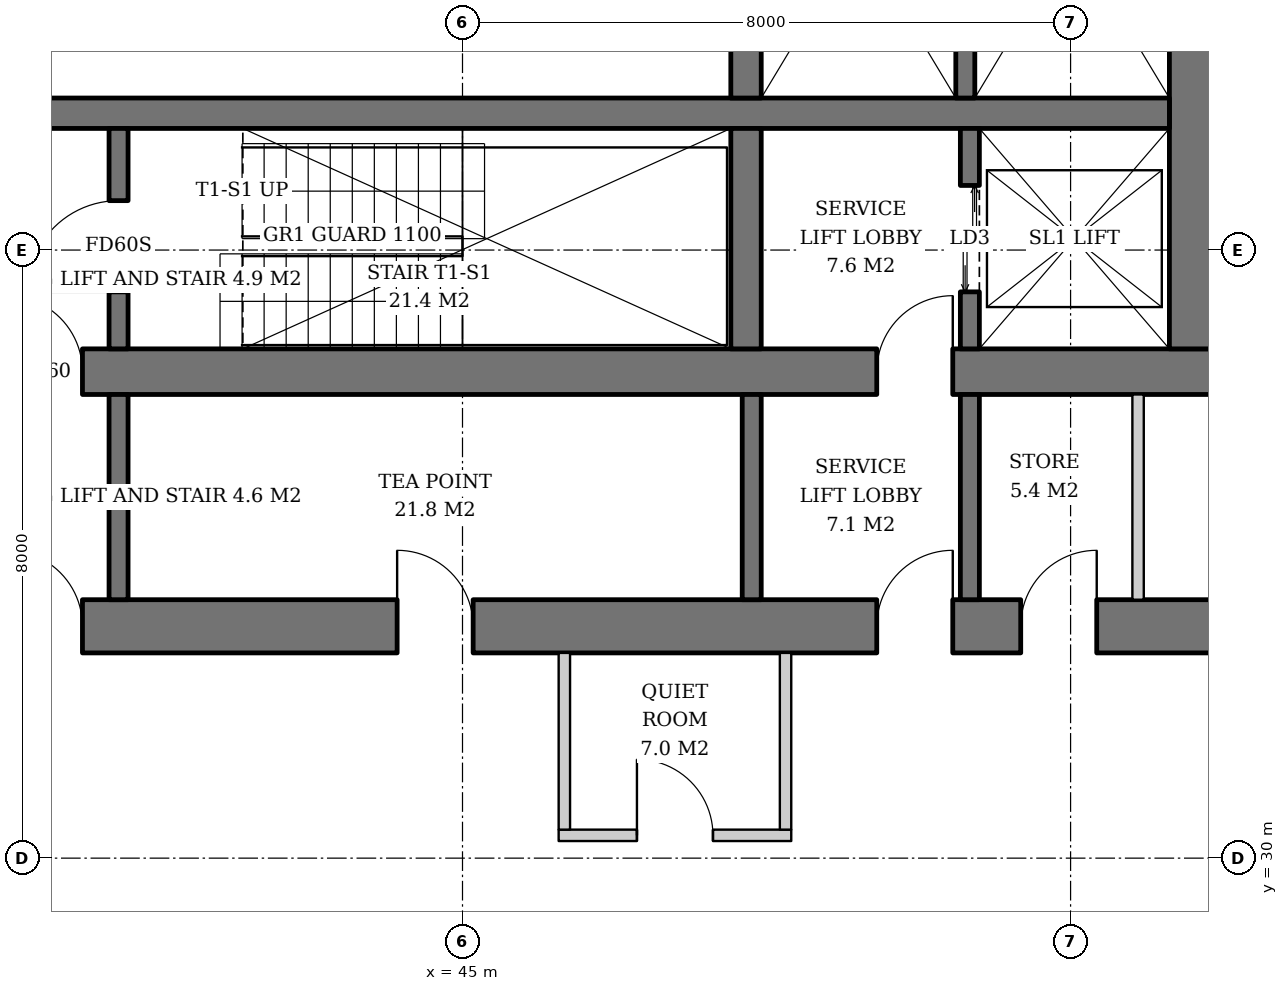
"""IFC4 building model, lengths in metres.
Left out: names, types, materials, properties, quantities, classifications, styles, units other than length and angle.
Written with IfcOpenShell. Run it as: python <this file> out.ifc"""

import sys

from ifc_helpers import new_model, si_unit, direction, frame, frame_2d, origin, place, context, subcontext, project, spatial, rectangle, extrude, element, fill, save


model = new_model("IFC4")
c1 = context("Model", 3, precision=1e-05, world=origin(), true_north=direction((0.0, 1.0)))
c2 = subcontext(c1, "Body", "Model", "MODEL_VIEW")
j1 = project(units=[si_unit("LENGTHUNIT", "METRE"), si_unit("PLANEANGLEUNIT", "RADIAN")], contexts=[c1])
p1 = place(None, origin())
s1 = spatial("IfcSite", under=j1, at=p1, CompositionType="ELEMENT")
p2 = place(p1, origin())
s2 = spatial("IfcBuilding", under=s1, at=p2, CompositionType="ELEMENT")
p3 = place(p2, frame((0.0, 0.0, 104.6)))
s3 = spatial("IfcBuildingStorey", under=s2, at=p3, CompositionType="ELEMENT", Elevation=104.6)
p4 = place(p3, frame((35.1, 36.4, 0.0), z_axis=(0.0, 0.0, 1.0), x_axis=(1.0, 0.0, 0.0)))
e1 = element("IfcWall", 1, at=p4, inside=s3, PredefinedType="SHEAR", context=c2, shape_type="SweptSolid", body=[
    extrude(rectangle(XDim=19.8, YDim=0.6, at=frame_2d((9.9, 0.0))), origin(), (0.0, 0.0, 1.0), 3.8),
])
p5 = place(p4, frame((3.9, 0.0, 0.0)))
e2 = element("IfcOpeningElement", 2, at=p5, cuts=e1, PredefinedType="OPENING", context=c2, shape_type="SweptSolid", body=[
    extrude(rectangle(XDim=1.0, YDim=2.1, at=frame_2d((0.5, 1.05))), frame((0.0, 0.31, 0.0), z_axis=(0.0, -1.0, 0.0), x_axis=(1.0, 0.0, 0.0)), (0.0, 0.0, 1.0), 0.62),
])
p6 = place(p4, frame((15.35, 0.0, 0.0)))
e3 = element("IfcOpeningElement", 3, at=p6, cuts=e1, PredefinedType="OPENING", context=c2, shape_type="SweptSolid", body=[
    extrude(rectangle(XDim=1.0, YDim=2.1, at=frame_2d((0.5, 1.05))), frame((0.0, 0.31, 0.0), z_axis=(0.0, -1.0, 0.0), x_axis=(1.0, 0.0, 0.0)), (0.0, 0.0, 1.0), 0.62),
])
p7 = place(p3, frame((54.6, 36.7, 0.0), z_axis=(0.0, 0.0, 1.0), x_axis=(0.0, 1.0, 0.0)))
e4 = element("IfcWall", 4, at=p7, inside=s3, PredefinedType="SHEAR", context=c2, shape_type="SweptSolid", body=[
    extrude(rectangle(XDim=18.6, YDim=0.6, at=frame_2d((9.3, 0.0))), origin(), (0.0, 0.0, 1.0), 3.8),
])
p8 = place(p7, frame((8.4, 0.0, 0.0)))
e5 = element("IfcOpeningElement", 5, at=p8, cuts=e4, PredefinedType="OPENING", context=c2, shape_type="SweptSolid", body=[
    extrude(rectangle(XDim=1.8, YDim=2.4, at=frame_2d((0.9, 1.2))), frame((0.0, 0.31, 0.0), z_axis=(0.0, -1.0, 0.0), x_axis=(1.0, 0.0, 0.0)), (0.0, 0.0, 1.0), 0.62),
])
p9 = place(p3, frame((31.7, 33.05, 0.0), z_axis=(0.0, 0.0, 1.0), x_axis=(1.0, 0.0, 0.0)))
e6 = element("IfcWall", 6, at=p9, inside=s3, PredefinedType="SHEAR", context=c2, shape_type="SweptSolid", body=[
    extrude(rectangle(XDim=26.6, YDim=0.7, at=frame_2d((13.3, 0.0))), origin(), (0.0, 0.0, 1.0), 3.8),
])
p10 = place(p9, frame((7.3, 0.0, 0.0)))
e7 = element("IfcOpeningElement", 7, at=p10, cuts=e6, PredefinedType="OPENING", context=c2, shape_type="SweptSolid", body=[
    extrude(rectangle(XDim=1.0, YDim=2.1, at=frame_2d((0.5, 1.05))), frame((0.0, 0.36, 0.0), z_axis=(0.0, -1.0, 0.0), x_axis=(1.0, 0.0, 0.0)), (0.0, 0.0, 1.0), 0.72),
])
p11 = place(p9, frame((18.75, 0.0, 0.0)))
e8 = element("IfcOpeningElement", 8, at=p11, cuts=e6, PredefinedType="OPENING", context=c2, shape_type="SweptSolid", body=[
    extrude(rectangle(XDim=1.0, YDim=2.1, at=frame_2d((0.5, 1.05))), frame((0.0, 0.36, 0.0), z_axis=(0.0, -1.0, 0.0), x_axis=(1.0, 0.0, 0.0)), (0.0, 0.0, 1.0), 0.72),
])
p12 = place(p9, frame((1.85, 0.0, 0.0)))
e9 = element("IfcOpeningElement", 9, at=p12, cuts=e6, PredefinedType="OPENING", context=c2, shape_type="SweptSolid", body=[
    extrude(rectangle(XDim=1.0, YDim=2.1, at=frame_2d((0.5, 1.05))), frame((0.0, 0.36, 0.0), z_axis=(0.0, -1.0, 0.0), x_axis=(1.0, 0.0, 0.0)), (0.0, 0.0, 1.0), 0.72),
])
p13 = place(p9, frame((4.7, 0.0, 0.0)))
e10 = element("IfcOpeningElement", 10, at=p13, cuts=e6, PredefinedType="OPENING", context=c2, shape_type="SweptSolid", body=[
    extrude(rectangle(XDim=1.0, YDim=2.1, at=frame_2d((0.5, 1.05))), frame((0.0, 0.36, 0.0), z_axis=(0.0, -1.0, 0.0), x_axis=(1.0, 0.0, 0.0)), (0.0, 0.0, 1.0), 0.72),
])
p14 = place(p9, frame((12.44, 0.0, 0.0)))
e11 = element("IfcOpeningElement", 11, at=p14, cuts=e6, PredefinedType="OPENING", context=c2, shape_type="SweptSolid", body=[
    extrude(rectangle(XDim=1.0, YDim=2.1, at=frame_2d((0.5, 1.05))), frame((0.0, 0.36, 0.0), z_axis=(0.0, -1.0, 0.0), x_axis=(1.0, 0.0, 0.0)), (0.0, 0.0, 1.0), 0.72),
])
p15 = place(p9, frame((20.644, 0.0, 0.0)))
e12 = element("IfcOpeningElement", 12, at=p15, cuts=e6, PredefinedType="OPENING", context=c2, shape_type="SweptSolid", body=[
    extrude(rectangle(XDim=1.0, YDim=2.1, at=frame_2d((0.5, 1.05))), frame((0.0, 0.36, 0.0), z_axis=(0.0, -1.0, 0.0), x_axis=(1.0, 0.0, 0.0)), (0.0, 0.0, 1.0), 0.72),
])
p16 = place(p9, frame((23.544, 0.0, 0.0)))
e13 = element("IfcOpeningElement", 13, at=p16, cuts=e6, PredefinedType="OPENING", context=c2, shape_type="SweptSolid", body=[
    extrude(rectangle(XDim=1.0, YDim=2.1, at=frame_2d((0.5, 1.05))), frame((0.0, 0.36, 0.0), z_axis=(0.0, -1.0, 0.0), x_axis=(1.0, 0.0, 0.0)), (0.0, 0.0, 1.0), 0.72),
])
p17 = place(p3, frame((35.7, 39.8, 0.0), z_axis=(0.0, 0.0, 1.0), x_axis=(1.0, 0.0, 0.0)))
e14 = element("IfcWall", 14, at=p17, inside=s3, PredefinedType="SHEAR", context=c2, shape_type="SweptSolid", body=[
    extrude(rectangle(XDim=18.6, YDim=0.4, at=frame_2d((9.3, 0.0))), origin(), (0.0, 0.0, 1.0), 3.8),
])
p18 = place(p3, frame((48.73, 36.7, 0.0), z_axis=(0.0, 0.0, 1.0), x_axis=(0.0, 1.0, 0.0)))
e15 = element("IfcWall", 15, at=p18, inside=s3, PredefinedType="SHEAR", context=c2, shape_type="SweptSolid", body=[
    extrude(rectangle(XDim=2.9, YDim=0.4, at=frame_2d((1.45, 0.0))), origin(), (0.0, 0.0, 1.0), 3.8),
])
p19 = place(p3, frame((48.73, 40.0, 0.0), z_axis=(0.0, 0.0, 1.0), x_axis=(0.0, 1.0, 0.0)))
e16 = element("IfcWall", 16, at=p19, inside=s3, PredefinedType="SHEAR", context=c2, shape_type="SweptSolid", body=[
    extrude(rectangle(XDim=12.0, YDim=0.4, at=frame_2d((6.0, 0.0))), origin(), (0.0, 0.0, 1.0), 3.8),
])
p20 = place(p3, frame((40.475, 36.7, 0.0), z_axis=(0.0, 0.0, 1.0), x_axis=(0.0, 1.0, 0.0)))
e17 = element("IfcWall", 17, at=p20, inside=s3, PredefinedType="SHEAR", context=c2, shape_type="SweptSolid", body=[
    extrude(rectangle(XDim=2.9, YDim=0.25, at=frame_2d((1.45, 0.0))), origin(), (0.0, 0.0, 1.0), 3.8),
])
p21 = place(p20, frame((0.75, 0.0, 0.0)))
e18 = element("IfcOpeningElement", 18, at=p21, cuts=e17, PredefinedType="OPENING", context=c2, shape_type="SweptSolid", body=[
    extrude(rectangle(XDim=1.2, YDim=2.1, at=frame_2d((0.6, 1.05))), frame((0.0, 0.135, 0.0), z_axis=(0.0, -1.0, 0.0), x_axis=(1.0, 0.0, 0.0)), (0.0, 0.0, 1.0), 0.27),
])
p22 = place(p3, frame((51.675, 36.7, 0.0), z_axis=(0.0, 0.0, 1.0), x_axis=(0.0, 1.0, 0.0)))
e19 = element("IfcWall", 19, at=p22, inside=s3, PredefinedType="SHEAR", context=c2, shape_type="SweptSolid", body=[
    extrude(rectangle(XDim=2.9, YDim=0.25, at=frame_2d((1.45, 0.0))), origin(), (0.0, 0.0, 1.0), 3.8),
])
p23 = place(p22, frame((0.75, 0.0, 0.0)))
e20 = element("IfcOpeningElement", 20, at=p23, cuts=e19, PredefinedType="OPENING", context=c2, shape_type="SweptSolid", body=[
    extrude(rectangle(XDim=1.4, YDim=2.4, at=frame_2d((0.7, 1.2))), frame((0.0, 0.135, 0.0), z_axis=(0.0, -1.0, 0.0), x_axis=(1.0, 0.0, 0.0)), (0.0, 0.0, 1.0), 0.27),
])
p24 = place(p3, frame((51.615, 44.25, 0.0), z_axis=(0.0, 0.0, 1.0), x_axis=(0.0, -1.0, 0.0)))
e21 = element("IfcWall", 21, at=p24, inside=s3, PredefinedType="SHEAR", context=c2, shape_type="SweptSolid", body=[
    extrude(rectangle(XDim=4.25, YDim=0.25, at=frame_2d((2.125, 0.0))), origin(), (0.0, 0.0, 1.0), 3.8),
])
for number, where, z_axis, x_axis in (
    (22, (40.475, 33.4, 0.0), (0.0, 0.0, 1.0), (0.0, 1.0, 0.0)),
    (23, (48.805, 33.4, 0.0), (0.0, 0.0, 1.0), (0.0, 1.0, 0.0)),
    (24, (51.675, 33.4, 0.0), (0.0, 0.0, 1.0), (0.0, 1.0, 0.0)),
):
    element("IfcWall", number, at=place(p3, frame(where, z_axis=z_axis, x_axis=x_axis)), inside=s3, PredefinedType="SOLIDWALL", context=c2, shape_type="SweptSolid", body=[
        extrude(rectangle(XDim=2.7, YDim=0.25, at=frame_2d((1.35, 0.0))), origin(), (0.0, 0.0, 1.0), 3.62),
    ])
p25 = place(p3, frame((53.888, 33.4, 0.0), z_axis=(0.0, 0.0, 1.0), x_axis=(0.0, 1.0, 0.0)))
e25 = element("IfcWall", 25, at=p25, inside=s3, PredefinedType="SOLIDWALL", context=c2, shape_type="SweptSolid", body=[
    extrude(rectangle(XDim=2.7, YDim=0.15, at=frame_2d((1.35, 0.0))), origin(), (0.0, 0.0, 1.0), 3.62),
])
p26 = place(p3, frame((46.265, 30.3, 0.0), z_axis=(0.0, 0.0, 1.0), x_axis=(1.0, 0.0, 0.0)))
e26 = element("IfcWall", 26, at=p26, inside=s3, PredefinedType="PARTITIONING", context=c2, shape_type="SweptSolid", body=[
    extrude(rectangle(XDim=3.06, YDim=0.15, at=frame_2d((1.53, 0.0))), origin(), (0.0, 0.0, 1.0), 2.858),
])
p27 = place(p26, frame((1.03, 0.0, 0.0)))
e27 = element("IfcOpeningElement", 27, at=p27, cuts=e26, PredefinedType="OPENING", context=c2, shape_type="SweptSolid", body=[
    extrude(rectangle(XDim=1.0, YDim=2.1, at=frame_2d((0.5, 1.05))), frame((0.0, 0.085, 0.0), z_axis=(0.0, -1.0, 0.0), x_axis=(1.0, 0.0, 0.0)), (0.0, 0.0, 1.0), 0.17),
])
p28 = place(p3, frame((46.34, 32.7, 0.0), z_axis=(0.0, 0.0, 1.0), x_axis=(0.0, -1.0, 0.0)))
e28 = element("IfcWall", 28, at=p28, inside=s3, PredefinedType="PARTITIONING", context=c2, shape_type="SweptSolid", body=[
    extrude(rectangle(XDim=2.325, YDim=0.15, at=frame_2d((1.163, 0.0))), origin(), (0.0, 0.0, 1.0), 3.62),
])
p29 = place(p3, frame((49.25, 32.7, 0.0), z_axis=(0.0, 0.0, 1.0), x_axis=(0.0, -1.0, 0.0)))
e29 = element("IfcWall", 29, at=p29, inside=s3, PredefinedType="PARTITIONING", context=c2, shape_type="SweptSolid", body=[
    extrude(rectangle(XDim=2.325, YDim=0.15, at=frame_2d((1.163, 0.0))), origin(), (0.0, 0.0, 1.0), 2.858),
])
p30 = place(p21, origin())
e30 = element("IfcDoor", 30, at=p30, inside=s3, OperationType="SINGLE_SWING_LEFT", PredefinedType="DOOR", context=c2, shape_type="SweptSolid", body=[
    extrude(rectangle(XDim=1.2, YDim=2.1, at=frame_2d((0.6, 1.05))), frame((0.0, 0.025, 0.0), z_axis=(0.0, -1.0, 0.0), x_axis=(1.0, 0.0, 0.0)), (0.0, 0.0, 1.0), 0.05),
])
fill(e18, e30)
p31 = place(p23, origin())
e31 = element("IfcDoor", 31, at=p31, inside=s3, OperationType="DOUBLE_DOOR_SLIDING", PredefinedType="DOOR", context=c2, shape_type="SweptSolid", body=[
    extrude(rectangle(XDim=1.4, YDim=2.4, at=frame_2d((0.7, 1.2))), frame((0.0, 0.025, 0.0), z_axis=(0.0, -1.0, 0.0), x_axis=(1.0, 0.0, 0.0)), (0.0, 0.0, 1.0), 0.05),
])
fill(e20, e31)
p32 = place(p5, origin())
e32 = element("IfcDoor", 32, at=p32, inside=s3, OperationType="SINGLE_SWING_LEFT", PredefinedType="DOOR", context=c2, shape_type="SweptSolid", body=[
    extrude(rectangle(XDim=1.0, YDim=2.1, at=frame_2d((0.5, 1.05))), frame((0.0, 0.025, 0.0), z_axis=(0.0, -1.0, 0.0), x_axis=(1.0, 0.0, 0.0)), (0.0, 0.0, 1.0), 0.05),
])
fill(e2, e32)
p33 = place(p6, origin())
e33 = element("IfcDoor", 33, at=p33, inside=s3, OperationType="SINGLE_SWING_RIGHT", PredefinedType="DOOR", context=c2, shape_type="SweptSolid", body=[
    extrude(rectangle(XDim=1.0, YDim=2.1, at=frame_2d((0.5, 1.05))), frame((0.0, 0.025, 0.0), z_axis=(0.0, -1.0, 0.0), x_axis=(1.0, 0.0, 0.0)), (0.0, 0.0, 1.0), 0.05),
])
fill(e3, e33)
p34 = place(p10, origin())
e34 = element("IfcDoor", 34, at=p34, inside=s3, OperationType="SINGLE_SWING_LEFT", PredefinedType="DOOR", context=c2, shape_type="SweptSolid", body=[
    extrude(rectangle(XDim=1.0, YDim=2.1, at=frame_2d((0.5, 1.05))), frame((0.0, 0.025, 0.0), z_axis=(0.0, -1.0, 0.0), x_axis=(1.0, 0.0, 0.0)), (0.0, 0.0, 1.0), 0.05),
])
fill(e7, e34)
p35 = place(p11, origin())
e35 = element("IfcDoor", 35, at=p35, inside=s3, OperationType="SINGLE_SWING_RIGHT", PredefinedType="DOOR", context=c2, shape_type="SweptSolid", body=[
    extrude(rectangle(XDim=1.0, YDim=2.1, at=frame_2d((0.5, 1.05))), frame((0.0, 0.025, 0.0), z_axis=(0.0, -1.0, 0.0), x_axis=(1.0, 0.0, 0.0)), (0.0, 0.0, 1.0), 0.05),
])
fill(e8, e35)
p36 = place(p14, origin())
e36 = element("IfcDoor", 36, at=p36, inside=s3, OperationType="SINGLE_SWING_LEFT", PredefinedType="DOOR", context=c2, shape_type="SweptSolid", body=[
    extrude(rectangle(XDim=1.0, YDim=2.1, at=frame_2d((0.5, 1.05))), frame((0.0, 0.34, 0.0), z_axis=(0.0, -1.0, 0.0), x_axis=(1.0, 0.0, 0.0)), (0.0, 0.0, 1.0), 0.05),
])
fill(e11, e36)
p37 = place(p15, origin())
e37 = element("IfcDoor", 37, at=p37, inside=s3, OperationType="SINGLE_SWING_RIGHT", PredefinedType="DOOR", context=c2, shape_type="SweptSolid", body=[
    extrude(rectangle(XDim=1.0, YDim=2.1, at=frame_2d((0.5, 1.05))), frame((0.0, 0.34, 0.0), z_axis=(0.0, -1.0, 0.0), x_axis=(1.0, 0.0, 0.0)), (0.0, 0.0, 1.0), 0.05),
])
fill(e12, e37)
p38 = place(p27, origin())
e38 = element("IfcDoor", 38, at=p38, inside=s3, OperationType="SINGLE_SWING_LEFT", PredefinedType="DOOR", context=c2, shape_type="SweptSolid", body=[
    extrude(rectangle(XDim=1.0, YDim=2.1, at=frame_2d((0.5, 1.05))), frame((0.0, 0.025, 0.0), z_axis=(0.0, -1.0, 0.0), x_axis=(1.0, 0.0, 0.0)), (0.0, 0.0, 1.0), 0.05),
])
fill(e27, e38)
save(model, sys.argv[1])
